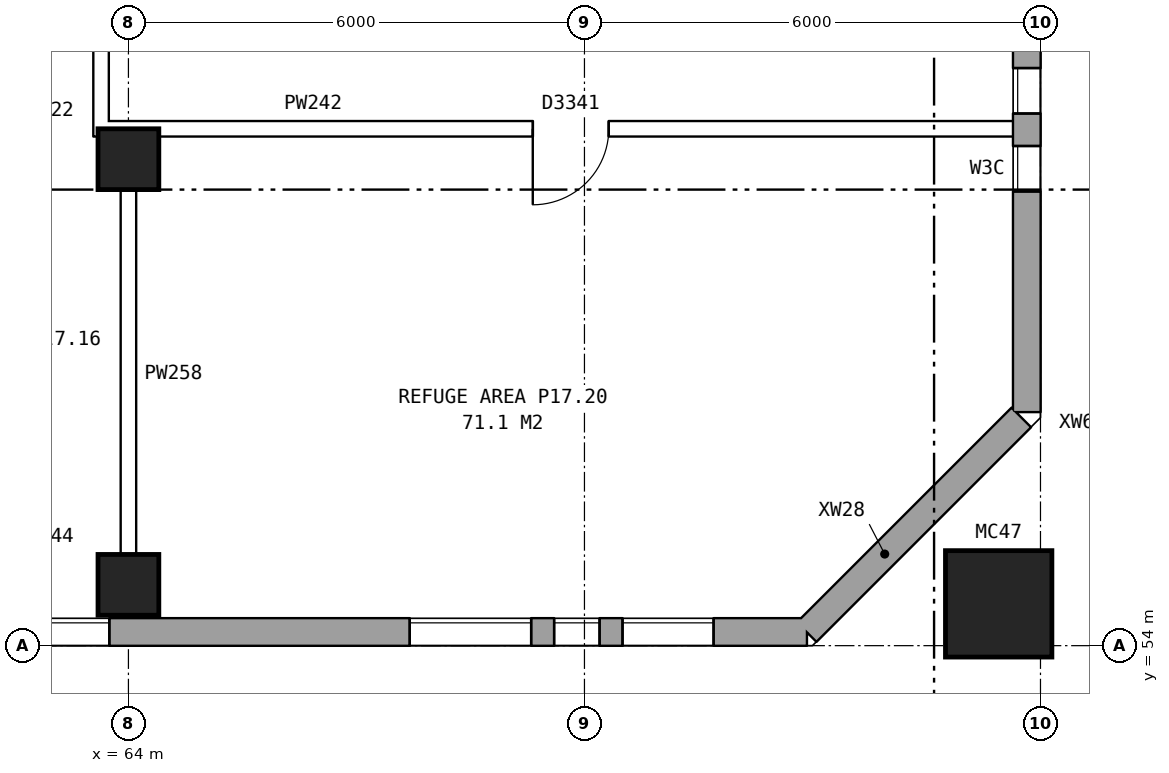
"""IFC4 building model, lengths in metres.
Left out: names, types, materials, properties, quantities, classifications, styles, units other than length and angle.
Written with IfcOpenShell. Run it as: python <this file> out.ifc"""

import sys

from ifc_helpers import new_model, si_unit, direction, frame, frame_2d, origin, origin_2d, place, context, subcontext, project, spatial, rectangle, hollow_rectangle, extrude, element, fill, save


model = new_model("IFC4")
c1 = context("Model", 3, precision=1e-05, world=origin(), true_north=direction((0.0, 1.0)))
c2 = subcontext(c1, "Body", "Model", "MODEL_VIEW")
j1 = project(units=[si_unit("LENGTHUNIT", "METRE"), si_unit("PLANEANGLEUNIT", "RADIAN")], contexts=[c1])
p1 = place(None, origin())
s1 = spatial("IfcSite", under=j1, at=p1, CompositionType="ELEMENT")
p2 = place(p1, origin())
s2 = spatial("IfcBuilding", under=s1, at=p2, CompositionType="ELEMENT")
p3 = place(p2, frame((0.0, 0.0, 62.9)))
s3 = spatial("IfcBuildingStorey", under=s2, at=p3, CompositionType="ELEMENT", Elevation=62.9)
for number, where, z_axis, x_axis in (
    (1, (64.0, 54.8, 0.0), (0.0, 0.0, 1.0), (1.0, 0.0, 0.0)),
    (2, (64.0, 60.4, 0.0), (0.0, 0.0, 1.0), (1.0, 0.0, 0.0)),
):
    element("IfcColumn", number, at=place(p3, frame(where, z_axis=z_axis, x_axis=x_axis)), inside=s3, PredefinedType="COLUMN", context=c2, shape_type="SweptSolid", body=[
        extrude(rectangle(XDim=0.8, YDim=0.8, at=origin_2d()), origin(), (0.0, 0.0, 1.0), 4.2),
    ])
p4 = place(p3, frame((75.45, 54.55, 0.0), z_axis=(0.0, 0.0, 1.0), x_axis=(1.0, 0.0, 0.0)))
e3 = element("IfcColumn", 3, at=p4, inside=s3, PredefinedType="COLUMN", context=c2, shape_type="SweptSolid", body=[
    extrude(hollow_rectangle(XDim=1.4, YDim=1.4, WallThickness=0.075, at=origin_2d()), origin(), (0.0, 0.0, 1.0), 4.5),
])
p5 = place(p3, frame((26.325, 54.18, 0.0), z_axis=(0.0, 0.0, 1.0), x_axis=(1.0, 0.0, 0.0)))
e4 = element("IfcWall", 4, at=p5, inside=s3, PredefinedType="STANDARD", context=c2, shape_type="SweptSolid", body=[
    extrude(rectangle(XDim=46.601, YDim=0.36, at=frame_2d((23.3, 0.0))), origin(), (0.0, 0.0, 1.0), 4.2),
])
p6 = place(p5, frame((0.6, 0.0, 1.5)))
e5 = element("IfcOpeningElement", 5, at=p6, cuts=e4, PredefinedType="OPENING", context=c2, shape_type="SweptSolid", body=[
    extrude(rectangle(XDim=0.6, YDim=1.2, at=frame_2d((0.3, 0.6))), frame((0.0, 0.19, 0.0), z_axis=(0.0, -1.0, 0.0), x_axis=(1.0, 0.0, 0.0)), (0.0, 0.0, 1.0), 0.38),
])
p7 = place(p5, frame((5.375, 0.0, 1.5)))
e6 = element("IfcOpeningElement", 6, at=p7, cuts=e4, PredefinedType="OPENING", context=c2, shape_type="SweptSolid", body=[
    extrude(rectangle(XDim=1.6, YDim=1.2, at=frame_2d((0.8, 0.6))), frame((0.0, 0.19, 0.0), z_axis=(0.0, -1.0, 0.0), x_axis=(1.0, 0.0, 0.0)), (0.0, 0.0, 1.0), 0.38),
])
p8 = place(p5, frame((8.375, 0.0, 1.5)))
e7 = element("IfcOpeningElement", 7, at=p8, cuts=e4, PredefinedType="OPENING", context=c2, shape_type="SweptSolid", body=[
    extrude(rectangle(XDim=1.6, YDim=1.2, at=frame_2d((0.8, 0.6))), frame((0.0, 0.19, 0.0), z_axis=(0.0, -1.0, 0.0), x_axis=(1.0, 0.0, 0.0)), (0.0, 0.0, 1.0), 0.38),
])
p9 = place(p5, frame((12.475, 0.0, 1.5)))
e8 = element("IfcOpeningElement", 8, at=p9, cuts=e4, PredefinedType="OPENING", context=c2, shape_type="SweptSolid", body=[
    extrude(rectangle(XDim=0.6, YDim=1.2, at=frame_2d((0.3, 0.6))), frame((0.0, 0.19, 0.0), z_axis=(0.0, -1.0, 0.0), x_axis=(1.0, 0.0, 0.0)), (0.0, 0.0, 1.0), 0.38),
])
p10 = place(p5, frame((13.375, 0.0, 1.5)))
e9 = element("IfcOpeningElement", 9, at=p10, cuts=e4, PredefinedType="OPENING", context=c2, shape_type="SweptSolid", body=[
    extrude(rectangle(XDim=1.2, YDim=1.2, at=frame_2d((0.6, 0.6))), frame((0.0, 0.19, 0.0), z_axis=(0.0, -1.0, 0.0), x_axis=(1.0, 0.0, 0.0)), (0.0, 0.0, 1.0), 0.38),
])
p11 = place(p5, frame((17.375, 0.0, 1.5)))
e10 = element("IfcOpeningElement", 10, at=p11, cuts=e4, PredefinedType="OPENING", context=c2, shape_type="SweptSolid", body=[
    extrude(rectangle(XDim=1.6, YDim=1.2, at=frame_2d((0.8, 0.6))), frame((0.0, 0.19, 0.0), z_axis=(0.0, -1.0, 0.0), x_axis=(1.0, 0.0, 0.0)), (0.0, 0.0, 1.0), 0.38),
])
p12 = place(p5, frame((20.375, 0.0, 1.5)))
e11 = element("IfcOpeningElement", 11, at=p12, cuts=e4, PredefinedType="OPENING", context=c2, shape_type="SweptSolid", body=[
    extrude(rectangle(XDim=1.6, YDim=1.2, at=frame_2d((0.8, 0.6))), frame((0.0, 0.19, 0.0), z_axis=(0.0, -1.0, 0.0), x_axis=(1.0, 0.0, 0.0)), (0.0, 0.0, 1.0), 0.38),
])
p13 = place(p5, frame((19.275, 0.0, 1.5)))
e12 = element("IfcOpeningElement", 12, at=p13, cuts=e4, PredefinedType="OPENING", context=c2, shape_type="SweptSolid", body=[
    extrude(rectangle(XDim=0.6, YDim=1.2, at=frame_2d((0.3, 0.6))), frame((0.0, 0.19, 0.0), z_axis=(0.0, -1.0, 0.0), x_axis=(1.0, 0.0, 0.0)), (0.0, 0.0, 1.0), 0.38),
])
p14 = place(p5, frame((29.375, 0.0, 1.5)))
e13 = element("IfcOpeningElement", 13, at=p14, cuts=e4, PredefinedType="OPENING", context=c2, shape_type="SweptSolid", body=[
    extrude(rectangle(XDim=1.6, YDim=1.2, at=frame_2d((0.8, 0.6))), frame((0.0, 0.19, 0.0), z_axis=(0.0, -1.0, 0.0), x_axis=(1.0, 0.0, 0.0)), (0.0, 0.0, 1.0), 0.38),
])
p15 = place(p5, frame((32.375, 0.0, 1.5)))
e14 = element("IfcOpeningElement", 14, at=p15, cuts=e4, PredefinedType="OPENING", context=c2, shape_type="SweptSolid", body=[
    extrude(rectangle(XDim=1.6, YDim=1.2, at=frame_2d((0.8, 0.6))), frame((0.0, 0.19, 0.0), z_axis=(0.0, -1.0, 0.0), x_axis=(1.0, 0.0, 0.0)), (0.0, 0.0, 1.0), 0.38),
])
p16 = place(p5, frame((36.225, 0.0, 1.5)))
e15 = element("IfcOpeningElement", 15, at=p16, cuts=e4, PredefinedType="OPENING", context=c2, shape_type="SweptSolid", body=[
    extrude(rectangle(XDim=1.2, YDim=1.2, at=frame_2d((0.6, 0.6))), frame((0.0, 0.19, 0.0), z_axis=(0.0, -1.0, 0.0), x_axis=(1.0, 0.0, 0.0)), (0.0, 0.0, 1.0), 0.38),
])
p17 = place(p5, frame((43.275, 0.0, 1.5)))
e16 = element("IfcOpeningElement", 16, at=p17, cuts=e4, PredefinedType="OPENING", context=c2, shape_type="SweptSolid", body=[
    extrude(rectangle(XDim=0.6, YDim=1.2, at=frame_2d((0.3, 0.6))), frame((0.0, 0.19, 0.0), z_axis=(0.0, -1.0, 0.0), x_axis=(1.0, 0.0, 0.0)), (0.0, 0.0, 1.0), 0.38),
])
p18 = place(p5, frame((41.375, 0.0, 1.5)))
e17 = element("IfcOpeningElement", 17, at=p18, cuts=e4, PredefinedType="OPENING", context=c2, shape_type="SweptSolid", body=[
    extrude(rectangle(XDim=1.6, YDim=1.2, at=frame_2d((0.8, 0.6))), frame((0.0, 0.19, 0.0), z_axis=(0.0, -1.0, 0.0), x_axis=(1.0, 0.0, 0.0)), (0.0, 0.0, 1.0), 0.38),
])
p19 = place(p5, frame((44.175, 0.0, 1.5)))
e18 = element("IfcOpeningElement", 18, at=p19, cuts=e4, PredefinedType="OPENING", context=c2, shape_type="SweptSolid", body=[
    extrude(rectangle(XDim=1.2, YDim=1.2, at=frame_2d((0.6, 0.6))), frame((0.0, 0.19, 0.0), z_axis=(0.0, -1.0, 0.0), x_axis=(1.0, 0.0, 0.0)), (0.0, 0.0, 1.0), 0.38),
])
p20 = place(p5, frame((1.5, 0.0, 1.5)))
e19 = element("IfcOpeningElement", 19, at=p20, cuts=e4, PredefinedType="OPENING", context=c2, shape_type="SweptSolid", body=[
    extrude(rectangle(XDim=1.2, YDim=1.2, at=frame_2d((0.6, 0.6))), frame((0.0, 0.19, 0.0), z_axis=(0.0, -1.0, 0.0), x_axis=(1.0, 0.0, 0.0)), (0.0, 0.0, 1.0), 0.38),
])
p21 = place(p5, frame((24.375, 0.0, 1.5)))
e20 = element("IfcOpeningElement", 20, at=p21, cuts=e4, PredefinedType="OPENING", context=c2, shape_type="SweptSolid", body=[
    extrude(rectangle(XDim=0.9, YDim=1.2, at=frame_2d((0.45, 0.6))), frame((0.0, 0.19, 0.0), z_axis=(0.0, -1.0, 0.0), x_axis=(1.0, 0.0, 0.0)), (0.0, 0.0, 1.0), 0.38),
])
p22 = place(p3, frame((72.925, 54.18, 0.0), z_axis=(0.0, 0.0, 1.0), x_axis=(0.707148882153, 0.707064677713, 0.0)))
e21 = element("IfcWall", 21, at=p22, inside=s3, PredefinedType="STANDARD", context=c2, shape_type="SweptSolid", body=[
    extrude(rectangle(XDim=2.899, YDim=0.36, at=frame_2d((1.45, 0.0))), origin(), (0.0, 0.0, 1.0), 4.2),
])
p23 = place(p3, frame((74.976, 56.23, 0.953), z_axis=(0.0, 0.0, 1.0), x_axis=(0.706994764273, 0.707218780358, 0.0)))
e22 = element("IfcWall", 22, at=p23, inside=s3, PredefinedType="STANDARD", context=c2, shape_type="SweptSolid", body=[
    extrude(rectangle(XDim=1.09, YDim=0.36, at=frame_2d((0.545, 0.0))), origin(), (0.0, 0.0, 1.0), 2.444),
])
p24 = place(p3, frame((75.82, 57.075, 0.0), z_axis=(0.0, 0.0, 1.0), x_axis=(0.0, 1.0, 0.0)))
e23 = element("IfcWall", 23, at=p24, inside=s3, PredefinedType="STANDARD", context=c2, shape_type="SweptSolid", body=[
    extrude(rectangle(XDim=25.851, YDim=0.36, at=frame_2d((12.925, 0.0))), origin(), (0.0, 0.0, 1.0), 4.2),
])
p25 = place(p24, frame((2.9, 0.0, 1.5)))
e24 = element("IfcOpeningElement", 24, at=p25, cuts=e23, PredefinedType="OPENING", context=c2, shape_type="SweptSolid", body=[
    extrude(rectangle(XDim=0.6, YDim=1.2, at=frame_2d((0.3, 0.6))), frame((0.0, 0.19, 0.0), z_axis=(0.0, -1.0, 0.0), x_axis=(1.0, 0.0, 0.0)), (0.0, 0.0, 1.0), 0.38),
])
p26 = place(p24, frame((3.925, 0.0, 1.5)))
e25 = element("IfcOpeningElement", 25, at=p26, cuts=e23, PredefinedType="OPENING", context=c2, shape_type="SweptSolid", body=[
    extrude(rectangle(XDim=0.6, YDim=1.2, at=frame_2d((0.3, 0.6))), frame((0.0, 0.19, 0.0), z_axis=(0.0, -1.0, 0.0), x_axis=(1.0, 0.0, 0.0)), (0.0, 0.0, 1.0), 0.38),
])
p27 = place(p24, frame((19.625, 0.0, 1.5)))
e26 = element("IfcOpeningElement", 26, at=p27, cuts=e23, PredefinedType="OPENING", context=c2, shape_type="SweptSolid", body=[
    extrude(rectangle(XDim=1.6, YDim=1.2, at=frame_2d((0.8, 0.6))), frame((0.0, 0.19, 0.0), z_axis=(0.0, -1.0, 0.0), x_axis=(1.0, 0.0, 0.0)), (0.0, 0.0, 1.0), 0.38),
])
p28 = place(p24, frame((22.325, 0.0, 1.5)))
e27 = element("IfcOpeningElement", 27, at=p28, cuts=e23, PredefinedType="OPENING", context=c2, shape_type="SweptSolid", body=[
    extrude(rectangle(XDim=0.6, YDim=1.2, at=frame_2d((0.3, 0.6))), frame((0.0, 0.19, 0.0), z_axis=(0.0, -1.0, 0.0), x_axis=(1.0, 0.0, 0.0)), (0.0, 0.0, 1.0), 0.38),
])
p29 = place(p3, frame((63.54, 60.8, 0.0), z_axis=(0.0, 0.0, 1.0), x_axis=(1.0, 0.0, 0.0)))
e28 = element("IfcWall", 28, at=p29, inside=s3, PredefinedType="PARTITIONING", context=c2, shape_type="SweptSolid", body=[
    extrude(rectangle(XDim=12.22, YDim=0.2, at=frame_2d((6.11, 0.0))), origin(), (0.0, 0.0, 1.0), 4.2),
])
p30 = place(p29, frame((5.78, 0.0, 0.0)))
e29 = element("IfcOpeningElement", 29, at=p30, cuts=e28, PredefinedType="OPENING", context=c2, shape_type="SweptSolid", body=[
    extrude(rectangle(XDim=1.0, YDim=2.1, at=frame_2d((0.5, 1.05))), frame((0.0, 0.11, 0.0), z_axis=(0.0, -1.0, 0.0), x_axis=(1.0, 0.0, 0.0)), (0.0, 0.0, 1.0), 0.22),
])
p31 = place(p3, frame((63.64, 60.7, 0.0), z_axis=(0.0, 0.0, 1.0), x_axis=(0.0, 1.0, 0.0)))
e30 = element("IfcWall", 30, at=p31, inside=s3, PredefinedType="PARTITIONING", context=c2, shape_type="SweptSolid", body=[
    extrude(rectangle(XDim=3.2, YDim=0.2, at=frame_2d((1.6, 0.0))), origin(), (0.0, 0.0, 1.0), 4.2),
])
p32 = place(p3, frame((64.0, 54.24, 0.0), z_axis=(0.0, 0.0, 1.0), x_axis=(0.0, 1.0, 0.0)))
e31 = element("IfcWall", 31, at=p32, inside=s3, PredefinedType="PARTITIONING", context=c2, shape_type="SweptSolid", body=[
    extrude(rectangle(XDim=6.66, YDim=0.2, at=frame_2d((3.33, 0.0))), origin(), (0.0, 0.0, 1.0), 4.2),
])
p33 = place(p16, origin())
e32 = element("IfcWindow", 32, at=p33, inside=s3, PartitioningType="DOUBLE_PANEL_HORIZONTAL", PredefinedType="WINDOW", context=c2, shape_type="SweptSolid", body=[
    extrude(rectangle(XDim=1.2, YDim=1.2, at=frame_2d((0.6, 0.6))), frame((0.0, 0.15, 0.0), z_axis=(0.0, -1.0, 0.0), x_axis=(1.0, 0.0, 0.0)), (0.0, 0.0, 1.0), 0.06),
])
fill(e15, e32)
p34 = place(p17, origin())
e33 = element("IfcWindow", 33, at=p34, inside=s3, PartitioningType="DOUBLE_PANEL_HORIZONTAL", PredefinedType="WINDOW", context=c2, shape_type="SweptSolid", body=[
    extrude(rectangle(XDim=0.6, YDim=1.2, at=frame_2d((0.3, 0.6))), frame((0.0, 0.15, 0.0), z_axis=(0.0, -1.0, 0.0), x_axis=(1.0, 0.0, 0.0)), (0.0, 0.0, 1.0), 0.06),
])
fill(e16, e33)
p35 = place(p18, origin())
e34 = element("IfcWindow", 34, at=p35, inside=s3, PartitioningType="DOUBLE_PANEL_HORIZONTAL", PredefinedType="WINDOW", context=c2, shape_type="SweptSolid", body=[
    extrude(rectangle(XDim=1.6, YDim=1.2, at=frame_2d((0.8, 0.6))), frame((0.0, 0.15, 0.0), z_axis=(0.0, -1.0, 0.0), x_axis=(1.0, 0.0, 0.0)), (0.0, 0.0, 1.0), 0.06),
])
fill(e17, e34)
p36 = place(p19, origin())
e35 = element("IfcWindow", 35, at=p36, inside=s3, PartitioningType="DOUBLE_PANEL_HORIZONTAL", PredefinedType="WINDOW", context=c2, shape_type="SweptSolid", body=[
    extrude(rectangle(XDim=1.2, YDim=1.2, at=frame_2d((0.6, 0.6))), frame((0.0, 0.15, 0.0), z_axis=(0.0, -1.0, 0.0), x_axis=(1.0, 0.0, 0.0)), (0.0, 0.0, 1.0), 0.06),
])
fill(e18, e35)
p37 = place(p25, origin())
e36 = element("IfcWindow", 36, at=p37, inside=s3, PartitioningType="DOUBLE_PANEL_HORIZONTAL", PredefinedType="WINDOW", context=c2, shape_type="SweptSolid", body=[
    extrude(rectangle(XDim=0.6, YDim=1.2, at=frame_2d((0.3, 0.6))), frame((0.0, 0.15, 0.0), z_axis=(0.0, -1.0, 0.0), x_axis=(1.0, 0.0, 0.0)), (0.0, 0.0, 1.0), 0.06),
])
fill(e24, e36)
p38 = place(p26, origin())
e37 = element("IfcWindow", 37, at=p38, inside=s3, PartitioningType="DOUBLE_PANEL_HORIZONTAL", PredefinedType="WINDOW", context=c2, shape_type="SweptSolid", body=[
    extrude(rectangle(XDim=0.6, YDim=1.2, at=frame_2d((0.3, 0.6))), frame((0.0, 0.15, 0.0), z_axis=(0.0, -1.0, 0.0), x_axis=(1.0, 0.0, 0.0)), (0.0, 0.0, 1.0), 0.06),
])
fill(e25, e37)
p39 = place(p30, frame((1.0, 0.0, 0.0), z_axis=(0.0, 0.0, 1.0), x_axis=(-1.0, 0.0, 0.0)))
e38 = element("IfcDoor", 38, at=p39, inside=s3, OperationType="SINGLE_SWING_RIGHT", PredefinedType="DOOR", context=c2, shape_type="SweptSolid", body=[
    extrude(rectangle(XDim=1.0, YDim=2.1, at=frame_2d((0.5, 1.05))), frame((0.0, 0.025, 0.0), z_axis=(0.0, -1.0, 0.0), x_axis=(1.0, 0.0, 0.0)), (0.0, 0.0, 1.0), 0.05),
])
fill(e29, e38)
save(model, sys.argv[1])
